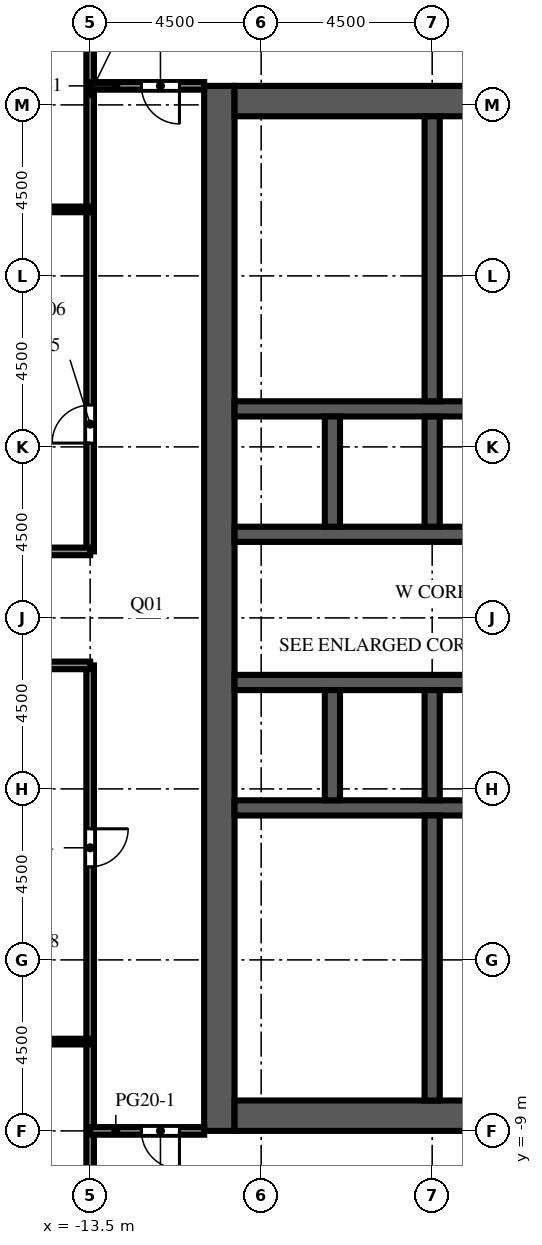
"""IFC4 building model, lengths in metres.
Left out: names, types, materials, properties, quantities, classifications, styles, units other than length and angle.
Written with IfcOpenShell. Run it as: python <this file> out.ifc"""

import sys

from ifc_helpers import new_model, si_unit, direction, frame, frame_2d, origin, place, context, subcontext, project, spatial, rectangle, extrude, element, fill, save


model = new_model("IFC4")
c1 = context("Model", 3, precision=1e-05, world=origin(), true_north=direction((0.0, 1.0)))
c2 = subcontext(c1, "Body", "Model", "MODEL_VIEW")
j1 = project(units=[si_unit("LENGTHUNIT", "METRE"), si_unit("PLANEANGLEUNIT", "RADIAN")], contexts=[c1])
p1 = place(None, origin())
s1 = spatial("IfcSite", under=j1, at=p1, CompositionType="ELEMENT")
p2 = place(p1, origin())
s2 = spatial("IfcBuilding", under=s1, at=p2, CompositionType="ELEMENT")
p3 = place(p2, frame((0.0, 0.0, 191.5)))
s3 = spatial("IfcBuildingStorey", under=s2, at=p3, CompositionType="ELEMENT", Elevation=191.5)
p4 = place(p3, frame((-10.1, -9.0, 0.0), z_axis=(0.0, 0.0, 1.0), x_axis=(0.0, 1.0, 0.0)))
e1 = element("IfcWall", 1, at=p4, inside=s3, PredefinedType="SHEAR", context=c2, shape_type="SweptSolid", body=[
    extrude(rectangle(XDim=27.5, YDim=0.8, at=frame_2d((13.75, 0.0))), origin(), (0.0, 0.0, 1.0), 4.1),
])
p5 = place(p4, frame((12.55, 0.0, 0.0)))
e2 = element("IfcOpeningElement", 2, at=p5, cuts=e1, PredefinedType="OPENING", context=c2, shape_type="SweptSolid", body=[
    extrude(rectangle(XDim=2.4, YDim=2.4, at=frame_2d((1.2, 1.2))), frame((0.0, 0.41, 0.0), z_axis=(0.0, -1.0, 0.0), x_axis=(1.0, 0.0, 0.0)), (0.0, 0.0, 1.0), 0.82),
])
p6 = place(p4, frame((6.825, 0.0, 0.0)))
e3 = element("IfcOpeningElement", 3, at=p6, cuts=e1, PredefinedType="OPENING", context=c2, shape_type="SweptSolid", body=[
    extrude(rectangle(XDim=1.2, YDim=2.1, at=frame_2d((0.6, 1.05))), frame((0.0, 0.41, 0.0), z_axis=(0.0, -1.0, 0.0), x_axis=(1.0, 0.0, 0.0)), (0.0, 0.0, 1.0), 0.82),
])
p7 = place(p4, frame((19.475, 0.0, 0.0)))
e4 = element("IfcOpeningElement", 4, at=p7, cuts=e1, PredefinedType="OPENING", context=c2, shape_type="SweptSolid", body=[
    extrude(rectangle(XDim=1.2, YDim=2.1, at=frame_2d((0.6, 1.05))), frame((0.0, 0.41, 0.0), z_axis=(0.0, -1.0, 0.0), x_axis=(1.0, 0.0, 0.0)), (0.0, 0.0, 1.0), 0.82),
])
for number, where, z_axis, x_axis in (
    (5, (-9.7, -8.6, 0.0), (0.0, 0.0, 1.0), (1.0, 0.0, 0.0)),
    (6, (-9.7, 18.1, 0.0), (0.0, 0.0, 1.0), (1.0, 0.0, 0.0)),
):
    element("IfcWall", number, at=place(p3, frame(where, z_axis=z_axis, x_axis=x_axis)), inside=s3, PredefinedType="SHEAR", context=c2, shape_type="SweptSolid", body=[
        extrude(rectangle(XDim=10.4, YDim=0.8, at=frame_2d((5.2, 0.0))), origin(), (0.0, 0.0, 1.0), 4.1),
    ])
p8 = place(p3, frame((-9.7, -0.5, 0.0), z_axis=(0.0, 0.0, 1.0), x_axis=(1.0, 0.0, 0.0)))
e7 = element("IfcWall", 7, at=p8, inside=s3, PredefinedType="SHEAR", context=c2, shape_type="SweptSolid", body=[
    extrude(rectangle(XDim=10.4, YDim=0.4, at=frame_2d((5.2, 0.0))), origin(), (0.0, 0.0, 1.0), 4.1),
])
p9 = place(p3, frame((-9.7, 2.8, 0.0), z_axis=(0.0, 0.0, 1.0), x_axis=(1.0, 0.0, 0.0)))
e8 = element("IfcWall", 8, at=p9, inside=s3, PredefinedType="SHEAR", context=c2, shape_type="SweptSolid", body=[
    extrude(rectangle(XDim=10.4, YDim=0.4, at=frame_2d((5.2, 0.0))), origin(), (0.0, 0.0, 1.0), 4.1),
])
p10 = place(p9, frame((0.738, 0.0, 0.0)))
e9 = element("IfcOpeningElement", 9, at=p10, cuts=e8, PredefinedType="OPENING", context=c2, shape_type="SweptSolid", body=[
    extrude(rectangle(XDim=1.1, YDim=2.1, at=frame_2d((0.55, 1.05))), frame((0.0, 0.21, 0.0), z_axis=(0.0, -1.0, 0.0), x_axis=(1.0, 0.0, 0.0)), (0.0, 0.0, 1.0), 0.42),
])
p11 = place(p9, frame((3.337, 0.0, 0.0)))
e10 = element("IfcOpeningElement", 10, at=p11, cuts=e8, PredefinedType="OPENING", context=c2, shape_type="SweptSolid", body=[
    extrude(rectangle(XDim=1.1, YDim=2.1, at=frame_2d((0.55, 1.05))), frame((0.0, 0.21, 0.0), z_axis=(0.0, -1.0, 0.0), x_axis=(1.0, 0.0, 0.0)), (0.0, 0.0, 1.0), 0.42),
])
p12 = place(p9, frame((6.012, 0.0, 0.0)))
e11 = element("IfcOpeningElement", 11, at=p12, cuts=e8, PredefinedType="OPENING", context=c2, shape_type="SweptSolid", body=[
    extrude(rectangle(XDim=1.0, YDim=2.1, at=frame_2d((0.5, 1.05))), frame((0.0, 0.21, 0.0), z_axis=(0.0, -1.0, 0.0), x_axis=(1.0, 0.0, 0.0)), (0.0, 0.0, 1.0), 0.42),
])
p13 = place(p9, frame((8.613, 0.0, 0.0)))
e12 = element("IfcOpeningElement", 12, at=p13, cuts=e8, PredefinedType="OPENING", context=c2, shape_type="SweptSolid", body=[
    extrude(rectangle(XDim=1.0, YDim=2.1, at=frame_2d((0.5, 1.05))), frame((0.0, 0.21, 0.0), z_axis=(0.0, -1.0, 0.0), x_axis=(1.0, 0.0, 0.0)), (0.0, 0.0, 1.0), 0.42),
])
p14 = place(p3, frame((-9.7, 6.7, 0.0), z_axis=(0.0, 0.0, 1.0), x_axis=(1.0, 0.0, 0.0)))
e13 = element("IfcWall", 13, at=p14, inside=s3, PredefinedType="SHEAR", context=c2, shape_type="SweptSolid", body=[
    extrude(rectangle(XDim=10.4, YDim=0.4, at=frame_2d((5.2, 0.0))), origin(), (0.0, 0.0, 1.0), 4.1),
])
p15 = place(p14, frame((3.337, 0.0, 0.0)))
e14 = element("IfcOpeningElement", 14, at=p15, cuts=e13, PredefinedType="OPENING", context=c2, shape_type="SweptSolid", body=[
    extrude(rectangle(XDim=1.1, YDim=2.1, at=frame_2d((0.55, 1.05))), frame((0.0, 0.21, 0.0), z_axis=(0.0, -1.0, 0.0), x_axis=(1.0, 0.0, 0.0)), (0.0, 0.0, 1.0), 0.42),
])
p16 = place(p14, frame((5.962, 0.0, 0.0)))
e15 = element("IfcOpeningElement", 15, at=p16, cuts=e13, PredefinedType="OPENING", context=c2, shape_type="SweptSolid", body=[
    extrude(rectangle(XDim=1.1, YDim=2.1, at=frame_2d((0.55, 1.05))), frame((0.0, 0.21, 0.0), z_axis=(0.0, -1.0, 0.0), x_axis=(1.0, 0.0, 0.0)), (0.0, 0.0, 1.0), 0.42),
])
p17 = place(p14, frame((8.663, 0.0, 0.0)))
e16 = element("IfcOpeningElement", 16, at=p17, cuts=e13, PredefinedType="OPENING", context=c2, shape_type="SweptSolid", body=[
    extrude(rectangle(XDim=1.1, YDim=2.1, at=frame_2d((0.55, 1.05))), frame((0.0, 0.21, 0.0), z_axis=(0.0, -1.0, 0.0), x_axis=(1.0, 0.0, 0.0)), (0.0, 0.0, 1.0), 0.42),
])
p18 = place(p14, frame((0.688, 0.0, 0.0)))
e17 = element("IfcOpeningElement", 17, at=p18, cuts=e13, PredefinedType="OPENING", context=c2, shape_type="SweptSolid", body=[
    extrude(rectangle(XDim=1.0, YDim=2.1, at=frame_2d((0.5, 1.05))), frame((0.0, 0.21, 0.0), z_axis=(0.0, -1.0, 0.0), x_axis=(1.0, 0.0, 0.0)), (0.0, 0.0, 1.0), 0.42),
])
p19 = place(p3, frame((-9.7, 10.0, 0.0), z_axis=(0.0, 0.0, 1.0), x_axis=(1.0, 0.0, 0.0)))
e18 = element("IfcWall", 18, at=p19, inside=s3, PredefinedType="SHEAR", context=c2, shape_type="SweptSolid", body=[
    extrude(rectangle(XDim=10.4, YDim=0.4, at=frame_2d((5.2, 0.0))), origin(), (0.0, 0.0, 1.0), 4.1),
])
for number, where, z_axis, x_axis in (
    (19, (-7.125, -0.3, 0.0), (0.0, 0.0, 1.0), (0.0, 1.0, 0.0)),
    (20, (-7.125, 6.9, 0.0), (0.0, 0.0, 1.0), (0.0, 1.0, 0.0)),
    (21, (-4.5, -0.3, 0.0), (0.0, 0.0, 1.0), (0.0, 1.0, 0.0)),
    (22, (-4.5, 6.9, 0.0), (0.0, 0.0, 1.0), (0.0, 1.0, 0.0)),
):
    element("IfcWall", number, at=place(p3, frame(where, z_axis=z_axis, x_axis=x_axis)), inside=s3, PredefinedType="SHEAR", context=c2, shape_type="SweptSolid", body=[
        extrude(rectangle(XDim=2.9, YDim=0.4, at=frame_2d((1.45, 0.0))), origin(), (0.0, 0.0, 1.0), 4.1),
    ])
for number, where, z_axis, x_axis in (
    (23, (-4.5, -8.2, 0.0), (0.0, 0.0, 1.0), (0.0, 1.0, 0.0)),
    (24, (-4.5, 10.2, 0.0), (0.0, 0.0, 1.0), (0.0, 1.0, 0.0)),
):
    element("IfcWall", number, at=place(p3, frame(where, z_axis=z_axis, x_axis=x_axis)), inside=s3, PredefinedType="SHEAR", context=c2, shape_type="SweptSolid", body=[
        extrude(rectangle(XDim=7.5, YDim=0.4, at=frame_2d((3.75, 0.0))), origin(), (0.0, 0.0, 1.0), 4.1),
    ])
for number, where, z_axis, x_axis in (
    (25, (-4.3, -5.95, 0.0), (0.0, 0.0, 1.0), (1.0, 0.0, 0.0)),
    (26, (-4.3, -2.95, 0.0), (0.0, 0.0, 1.0), (1.0, 0.0, 0.0)),
):
    element("IfcWall", number, at=place(p3, frame(where, z_axis=z_axis, x_axis=x_axis)), inside=s3, PredefinedType="PARTITIONING", context=c2, shape_type="SweptSolid", body=[
        extrude(rectangle(XDim=3.4, YDim=0.1, at=frame_2d((1.7, 0.0))), origin(), (0.0, 0.0, 1.0), 3.65),
    ])
for number, where, z_axis, x_axis in (
    (27, (-4.3, 11.7, 0.0), (0.0, 0.0, 1.0), (1.0, 0.0, 0.0)),
    (28, (-4.3, 13.575, 0.0), (0.0, 0.0, 1.0), (1.0, 0.0, 0.0)),
    (29, (-4.3, 15.825, 0.0), (0.0, 0.0, 1.0), (1.0, 0.0, 0.0)),
):
    element("IfcWall", number, at=place(p3, frame(where, z_axis=z_axis, x_axis=x_axis)), inside=s3, PredefinedType="PARTITIONING", context=c2, shape_type="SweptSolid", body=[
        extrude(rectangle(XDim=5.0, YDim=0.1, at=frame_2d((2.5, 0.0))), origin(), (0.0, 0.0, 1.0), 3.65),
    ])
p20 = place(p3, frame((-13.5, -26.5, 0.0), z_axis=(0.0, 0.0, 1.0), x_axis=(0.0, 1.0, 0.0)))
e30 = element("IfcWall", 30, at=p20, inside=s3, PredefinedType="PARTITIONING", context=c2, shape_type="SweptSolid", body=[
    extrude(rectangle(XDim=29.75, YDim=0.2, at=frame_2d((14.875, 0.0))), origin(), (0.0, 0.0, 1.0), 3.65),
])
p21 = place(p20, frame((24.45, 0.0, 0.0)))
e31 = element("IfcOpeningElement", 31, at=p21, cuts=e30, PredefinedType="OPENING", context=c2, shape_type="SweptSolid", body=[
    extrude(rectangle(XDim=1.0, YDim=2.1, at=frame_2d((0.5, 1.05))), frame((0.0, 0.11, 0.0), z_axis=(0.0, -1.0, 0.0), x_axis=(1.0, 0.0, 0.0)), (0.0, 0.0, 1.0), 0.22),
])
p22 = place(p3, frame((-13.5, 6.25, 0.0), z_axis=(0.0, 0.0, 1.0), x_axis=(0.0, 1.0, 0.0)))
e32 = element("IfcWall", 32, at=p22, inside=s3, PredefinedType="PARTITIONING", context=c2, shape_type="SweptSolid", body=[
    extrude(rectangle(XDim=20.25, YDim=0.2, at=frame_2d((10.125, 0.0))), origin(), (0.0, 0.0, 1.0), 3.65),
])
p23 = place(p22, frame((2.85, 0.0, 0.0)))
e33 = element("IfcOpeningElement", 33, at=p23, cuts=e32, PredefinedType="OPENING", context=c2, shape_type="SweptSolid", body=[
    extrude(rectangle(XDim=1.0, YDim=2.1, at=frame_2d((0.5, 1.05))), frame((0.0, 0.11, 0.0), z_axis=(0.0, -1.0, 0.0), x_axis=(1.0, 0.0, 0.0)), (0.0, 0.0, 1.0), 0.22),
])
p24 = place(p3, frame((-10.5, -9.0, 0.0), z_axis=(0.0, 0.0, 1.0), x_axis=(-1.0, 0.0, 0.0)))
e34 = element("IfcWall", 34, at=p24, inside=s3, PredefinedType="PARTITIONING", context=c2, shape_type="SweptSolid", body=[
    extrude(rectangle(XDim=3.0, YDim=0.2, at=frame_2d((1.5, 0.0))), origin(), (0.0, 0.0, 1.0), 3.65),
])
p25 = place(p24, frame((0.65, 0.0, 0.0)))
e35 = element("IfcOpeningElement", 35, at=p25, cuts=e34, PredefinedType="OPENING", context=c2, shape_type="SweptSolid", body=[
    extrude(rectangle(XDim=1.0, YDim=2.1, at=frame_2d((0.5, 1.05))), frame((0.0, 0.11, 0.0), z_axis=(0.0, -1.0, 0.0), x_axis=(1.0, 0.0, 0.0)), (0.0, 0.0, 1.0), 0.22),
])
p26 = place(p3, frame((-13.5, -6.65, 0.0), z_axis=(0.0, 0.0, 1.0), x_axis=(-1.0, 0.0, 0.0)))
e36 = element("IfcWall", 36, at=p26, inside=s3, PredefinedType="PARTITIONING", context=c2, shape_type="SweptSolid", body=[
    extrude(rectangle(XDim=8.85, YDim=0.15, at=frame_2d((4.425, 0.0))), origin(), (0.0, 0.0, 1.0), 3.65),
])
p27 = place(p26, frame((4.9, 0.0, 0.0)))
e37 = element("IfcOpeningElement", 37, at=p27, cuts=e36, PredefinedType="OPENING", context=c2, shape_type="SweptSolid", body=[
    extrude(rectangle(XDim=1.0, YDim=2.1, at=frame_2d((0.5, 1.05))), frame((0.0, 0.085, 0.0), z_axis=(0.0, -1.0, 0.0), x_axis=(1.0, 0.0, 0.0)), (0.0, 0.0, 1.0), 0.17),
])
for number, where, z_axis, x_axis in (
    (38, (-22.35, 3.25, 0.0), (0.0, 0.0, 1.0), (1.0, 0.0, 0.0)),
    (39, (-22.35, 6.25, 0.0), (0.0, 0.0, 1.0), (1.0, 0.0, 0.0)),
):
    element("IfcWall", number, at=place(p3, frame(where, z_axis=z_axis, x_axis=x_axis)), inside=s3, PredefinedType="PARTITIONING", context=c2, shape_type="SweptSolid", body=[
        extrude(rectangle(XDim=8.85, YDim=0.2, at=frame_2d((4.425, 0.0))), origin(), (0.0, 0.0, 1.0), 3.65),
    ])
p28 = place(p3, frame((-22.35, 15.25, 0.0), z_axis=(0.0, 0.0, 1.0), x_axis=(1.0, 0.0, 0.0)))
e40 = element("IfcWall", 40, at=p28, inside=s3, PredefinedType="PARTITIONING", context=c2, shape_type="SweptSolid", body=[
    extrude(rectangle(XDim=8.85, YDim=0.15, at=frame_2d((4.425, 0.0))), origin(), (0.0, 0.0, 1.0), 3.65),
])
p29 = place(p28, frame((3.95, 0.0, 0.0)))
e41 = element("IfcOpeningElement", 41, at=p29, cuts=e40, PredefinedType="OPENING", context=c2, shape_type="SweptSolid", body=[
    extrude(rectangle(XDim=1.0, YDim=2.1, at=frame_2d((0.5, 1.05))), frame((0.0, 0.085, 0.0), z_axis=(0.0, -1.0, 0.0), x_axis=(1.0, 0.0, 0.0)), (0.0, 0.0, 1.0), 0.17),
])
p30 = place(p3, frame((-13.5, 18.5, 0.0), z_axis=(0.0, 0.0, 1.0), x_axis=(1.0, 0.0, 0.0)))
e42 = element("IfcWall", 42, at=p30, inside=s3, PredefinedType="PARTITIONING", context=c2, shape_type="SweptSolid", body=[
    extrude(rectangle(XDim=3.0, YDim=0.2, at=frame_2d((1.5, 0.0))), origin(), (0.0, 0.0, 1.0), 3.65),
])
p31 = place(p30, frame((1.35, 0.0, 0.0)))
e43 = element("IfcOpeningElement", 43, at=p31, cuts=e42, PredefinedType="OPENING", context=c2, shape_type="SweptSolid", body=[
    extrude(rectangle(XDim=1.0, YDim=2.1, at=frame_2d((0.5, 1.05))), frame((0.0, 0.11, 0.0), z_axis=(0.0, -1.0, 0.0), x_axis=(1.0, 0.0, 0.0)), (0.0, 0.0, 1.0), 0.22),
])
p32 = place(p10, origin())
e44 = element("IfcDoor", 44, at=p32, inside=s3, OperationType="DOUBLE_DOOR_SLIDING", PredefinedType="DOOR", context=c2, shape_type="SweptSolid", body=[
    extrude(rectangle(XDim=1.1, YDim=2.1, at=frame_2d((0.55, 1.05))), frame((0.0, 0.025, 0.0), z_axis=(0.0, -1.0, 0.0), x_axis=(1.0, 0.0, 0.0)), (0.0, 0.0, 1.0), 0.05),
])
fill(e9, e44)
p33 = place(p11, origin())
e45 = element("IfcDoor", 45, at=p33, inside=s3, OperationType="DOUBLE_DOOR_SLIDING", PredefinedType="DOOR", context=c2, shape_type="SweptSolid", body=[
    extrude(rectangle(XDim=1.1, YDim=2.1, at=frame_2d((0.55, 1.05))), frame((0.0, 0.025, 0.0), z_axis=(0.0, -1.0, 0.0), x_axis=(1.0, 0.0, 0.0)), (0.0, 0.0, 1.0), 0.05),
])
fill(e10, e45)
p34 = place(p15, origin())
e46 = element("IfcDoor", 46, at=p34, inside=s3, OperationType="DOUBLE_DOOR_SLIDING", PredefinedType="DOOR", context=c2, shape_type="SweptSolid", body=[
    extrude(rectangle(XDim=1.1, YDim=2.1, at=frame_2d((0.55, 1.05))), frame((0.0, 0.025, 0.0), z_axis=(0.0, -1.0, 0.0), x_axis=(1.0, 0.0, 0.0)), (0.0, 0.0, 1.0), 0.05),
])
fill(e14, e46)
p35 = place(p16, origin())
e47 = element("IfcDoor", 47, at=p35, inside=s3, OperationType="DOUBLE_DOOR_SLIDING", PredefinedType="DOOR", context=c2, shape_type="SweptSolid", body=[
    extrude(rectangle(XDim=1.1, YDim=2.1, at=frame_2d((0.55, 1.05))), frame((0.0, 0.025, 0.0), z_axis=(0.0, -1.0, 0.0), x_axis=(1.0, 0.0, 0.0)), (0.0, 0.0, 1.0), 0.05),
])
fill(e15, e47)
p36 = place(p5, origin())
e48 = element("IfcDoor", 48, at=p36, inside=s3, OperationType="DOUBLE_DOOR_DOUBLE_SWING", PredefinedType="DOOR", context=c2, shape_type="SweptSolid", body=[
    extrude(rectangle(XDim=2.4, YDim=2.4, at=frame_2d((1.2, 1.2))), frame((0.0, 0.025, 0.0), z_axis=(0.0, -1.0, 0.0), x_axis=(1.0, 0.0, 0.0)), (0.0, 0.0, 1.0), 0.05),
])
fill(e2, e48)
p37 = place(p6, origin())
e49 = element("IfcDoor", 49, at=p37, inside=s3, OperationType="SINGLE_SWING_LEFT", PredefinedType="DOOR", context=c2, shape_type="SweptSolid", body=[
    extrude(rectangle(XDim=1.2, YDim=2.1, at=frame_2d((0.6, 1.05))), frame((0.0, 0.025, 0.0), z_axis=(0.0, -1.0, 0.0), x_axis=(1.0, 0.0, 0.0)), (0.0, 0.0, 1.0), 0.05),
])
fill(e3, e49)
p38 = place(p7, origin())
e50 = element("IfcDoor", 50, at=p38, inside=s3, OperationType="SINGLE_SWING_LEFT", PredefinedType="DOOR", context=c2, shape_type="SweptSolid", body=[
    extrude(rectangle(XDim=1.2, YDim=2.1, at=frame_2d((0.6, 1.05))), frame((0.0, 0.025, 0.0), z_axis=(0.0, -1.0, 0.0), x_axis=(1.0, 0.0, 0.0)), (0.0, 0.0, 1.0), 0.05),
])
fill(e4, e50)
p39 = place(p18, origin())
e51 = element("IfcDoor", 51, at=p39, inside=s3, OperationType="SINGLE_SWING_LEFT", PredefinedType="DOOR", context=c2, shape_type="SweptSolid", body=[
    extrude(rectangle(XDim=1.0, YDim=2.1, at=frame_2d((0.5, 1.05))), frame((0.0, 0.025, 0.0), z_axis=(0.0, -1.0, 0.0), x_axis=(1.0, 0.0, 0.0)), (0.0, 0.0, 1.0), 0.05),
])
fill(e17, e51)
p40 = place(p21, origin())
e52 = element("IfcDoor", 52, at=p40, inside=s3, OperationType="SINGLE_SWING_RIGHT", PredefinedType="DOOR", context=c2, shape_type="SweptSolid", body=[
    extrude(rectangle(XDim=1.0, YDim=2.1, at=frame_2d((0.5, 1.05))), frame((0.0, 0.025, 0.0), z_axis=(0.0, -1.0, 0.0), x_axis=(1.0, 0.0, 0.0)), (0.0, 0.0, 1.0), 0.05),
])
fill(e31, e52)
p41 = place(p23, origin())
e53 = element("IfcDoor", 53, at=p41, inside=s3, OperationType="SINGLE_SWING_LEFT", PredefinedType="DOOR", context=c2, shape_type="SweptSolid", body=[
    extrude(rectangle(XDim=1.0, YDim=2.1, at=frame_2d((0.5, 1.05))), frame((0.0, 0.025, 0.0), z_axis=(0.0, -1.0, 0.0), x_axis=(1.0, 0.0, 0.0)), (0.0, 0.0, 1.0), 0.05),
])
fill(e33, e53)
p42 = place(p25, origin())
e54 = element("IfcDoor", 54, at=p42, inside=s3, OperationType="SINGLE_SWING_LEFT", PredefinedType="DOOR", context=c2, shape_type="SweptSolid", body=[
    extrude(rectangle(XDim=1.0, YDim=2.1, at=frame_2d((0.5, 1.05))), frame((0.0, 0.025, 0.0), z_axis=(0.0, -1.0, 0.0), x_axis=(1.0, 0.0, 0.0)), (0.0, 0.0, 1.0), 0.05),
])
fill(e35, e54)
p43 = place(p31, origin())
e55 = element("IfcDoor", 55, at=p43, inside=s3, OperationType="SINGLE_SWING_RIGHT", PredefinedType="DOOR", context=c2, shape_type="SweptSolid", body=[
    extrude(rectangle(XDim=1.0, YDim=2.1, at=frame_2d((0.5, 1.05))), frame((0.0, 0.025, 0.0), z_axis=(0.0, -1.0, 0.0), x_axis=(1.0, 0.0, 0.0)), (0.0, 0.0, 1.0), 0.05),
])
fill(e43, e55)
save(model, sys.argv[1])
